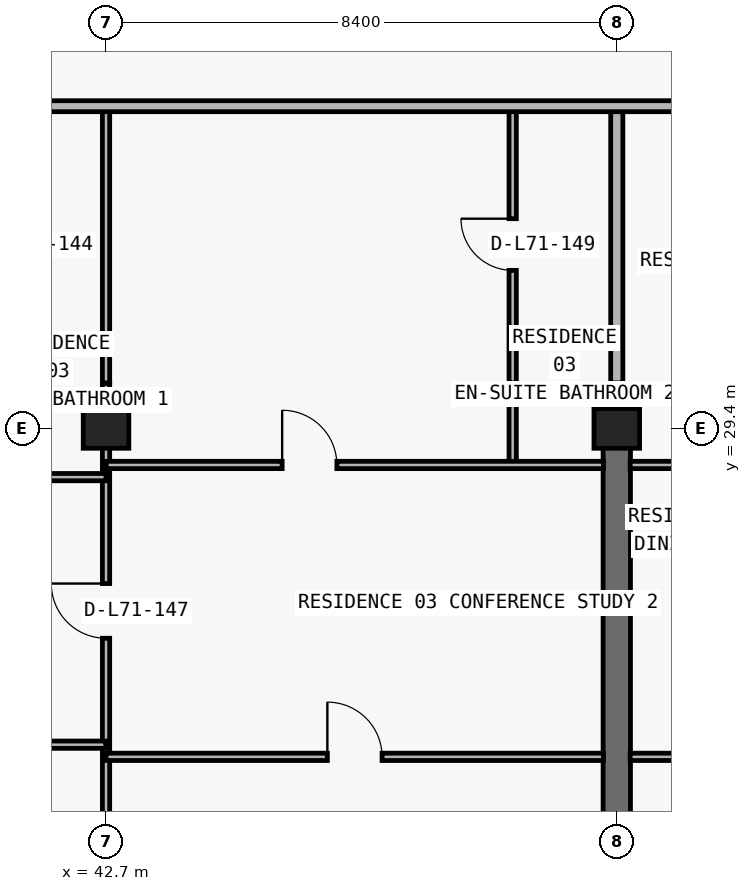
"""IFC4 building model, lengths in metres.
Left out: names, types, materials, properties, quantities, classifications, styles, units other than length and angle.
Written with IfcOpenShell. Run it as: python <this file> out.ifc"""

import sys

from ifc_helpers import new_model, si_unit, direction, frame, frame_2d, origin, origin_2d, place, context, subcontext, project, spatial, rectangle, extrude, element, fill, save


model = new_model("IFC4")
c1 = context("Model", 3, precision=1e-05, world=origin(), true_north=direction((0.0, 1.0)))
c2 = subcontext(c1, "Body", "Model", "MODEL_VIEW")
j1 = project(units=[si_unit("LENGTHUNIT", "METRE"), si_unit("PLANEANGLEUNIT", "RADIAN")], contexts=[c1])
p1 = place(None, origin())
s1 = spatial("IfcSite", under=j1, at=p1, CompositionType="ELEMENT")
p2 = place(p1, origin())
s2 = spatial("IfcBuilding", under=s1, at=p2, CompositionType="ELEMENT")
p3 = place(p2, frame((0.0, 0.0, 252.9)))
s3 = spatial("IfcBuildingStorey", under=s2, at=p3, CompositionType="ELEMENT", Elevation=252.9)
for number, where, z_axis, x_axis in (
    (1, (42.7, 29.4, 0.0), (0.0, 0.0, 1.0), (1.0, 0.0, 0.0)),
    (2, (51.1, 29.4, 0.0), (0.0, 0.0, 1.0), (1.0, 0.0, 0.0)),
):
    element("IfcColumn", number, at=place(p3, frame(where, z_axis=z_axis, x_axis=x_axis)), inside=s3, PredefinedType="COLUMN", context=c2, shape_type="SweptSolid", body=[
        extrude(rectangle(XDim=0.75, YDim=0.65, at=origin_2d()), origin(), (0.0, 0.0, 1.0), 3.05),
    ])
p4 = place(p3, frame((51.1, 20.8, 0.0), z_axis=(0.0, 0.0, 1.0), x_axis=(0.0, 1.0, 0.0)))
e3 = element("IfcWall", 3, at=p4, inside=s3, PredefinedType="SHEAR", context=c2, shape_type="SweptSolid", body=[
    extrude(rectangle(XDim=8.6, YDim=0.45, at=frame_2d((4.3, 0.0))), origin(), (0.0, 0.0, 1.0), 3.05),
])
p5 = place(p3, frame((42.7, 13.34, 0.0), z_axis=(0.0, 0.0, 1.0), x_axis=(0.0, 1.0, 0.0)))
e4 = element("IfcWall", 4, at=p5, inside=s3, PredefinedType="PARTITIONING", context=c2, shape_type="SweptSolid", body=[
    extrude(rectangle(XDim=16.8, YDim=0.12, at=frame_2d((8.4, 0.0))), origin(), (0.0, 0.0, 1.0), 2.263),
])
p6 = place(p5, frame((12.61, 0.0, 0.0)))
e5 = element("IfcOpeningElement", 5, at=p6, cuts=e4, PredefinedType="OPENING", context=c2, shape_type="SweptSolid", body=[
    extrude(rectangle(XDim=0.9, YDim=2.15, at=frame_2d((0.45, 1.075))), frame((0.0, 0.07, 0.0), z_axis=(0.0, -1.0, 0.0), x_axis=(1.0, 0.0, 0.0)), (0.0, 0.0, 1.0), 0.14),
])
p7 = place(p3, frame((42.7, 30.15, 0.0), z_axis=(0.0, 0.0, 1.0), x_axis=(0.0, 1.0, 0.0)))
e6 = element("IfcWall", 6, at=p7, inside=s3, PredefinedType="PARTITIONING", context=c2, shape_type="SweptSolid", body=[
    extrude(rectangle(XDim=4.55, YDim=0.12, at=frame_2d((2.275, 0.0))), origin(), (0.0, 0.0, 1.0), 2.263),
])
p8 = place(p3, frame((49.388, 28.8, 0.0), z_axis=(0.0, 0.0, 1.0), x_axis=(0.0, 1.0, 0.0)))
e7 = element("IfcWall", 7, at=p8, inside=s3, PredefinedType="PARTITIONING", context=c2, shape_type="SweptSolid", body=[
    extrude(rectangle(XDim=1.34, YDim=0.12, at=frame_2d((0.67, 0.0))), origin(), (0.0, 0.0, 1.0), 3.05),
])
p9 = place(p3, frame((49.388, 30.15, 0.0), z_axis=(0.0, 0.0, 1.0), x_axis=(0.0, 1.0, 0.0)))
e8 = element("IfcWall", 8, at=p9, inside=s3, PredefinedType="PARTITIONING", context=c2, shape_type="SweptSolid", body=[
    extrude(rectangle(XDim=4.55, YDim=0.12, at=frame_2d((2.275, 0.0))), origin(), (0.0, 0.0, 1.0), 3.05),
])
p10 = place(p9, frame((1.85, 0.0, 0.0)))
e9 = element("IfcOpeningElement", 9, at=p10, cuts=e8, PredefinedType="OPENING", context=c2, shape_type="SweptSolid", body=[
    extrude(rectangle(XDim=0.85, YDim=2.1, at=frame_2d((0.425, 1.05))), frame((0.0, 0.07, 0.0), z_axis=(0.0, -1.0, 0.0), x_axis=(1.0, 0.0, 0.0)), (0.0, 0.0, 1.0), 0.14),
])
p11 = place(p3, frame((51.1, 29.405, 0.0), z_axis=(0.0, 0.0, 1.0), x_axis=(0.0, 1.0, 0.0)))
e10 = element("IfcWall", 10, at=p11, inside=s3, PredefinedType="PARTITIONING", context=c2, shape_type="SweptSolid", body=[
    extrude(rectangle(XDim=0.735, YDim=0.2, at=frame_2d((0.367, 0.0))), origin(), (0.0, 0.0, 1.0), 2.335),
])
p12 = place(p3, frame((51.1, 30.15, 0.0), z_axis=(0.0, 0.0, 1.0), x_axis=(0.0, 1.0, 0.0)))
e11 = element("IfcWall", 11, at=p12, inside=s3, PredefinedType="PARTITIONING", context=c2, shape_type="SweptSolid", body=[
    extrude(rectangle(XDim=4.55, YDim=0.2, at=frame_2d((2.275, 0.0))), origin(), (0.0, 0.0, 1.0), 2.335),
])
p13 = place(p3, frame((42.7, 24.0, 0.0), z_axis=(0.0, 0.0, 1.0), x_axis=(1.0, 0.0, 0.0)))
e12 = element("IfcWall", 12, at=p13, inside=s3, PredefinedType="PARTITIONING", context=c2, shape_type="SweptSolid", body=[
    extrude(rectangle(XDim=8.18, YDim=0.12, at=frame_2d((4.09, 0.0))), origin(), (0.0, 0.0, 1.0), 3.05),
])
p14 = place(p13, frame((3.64, 0.0, 0.0)))
e13 = element("IfcOpeningElement", 13, at=p14, cuts=e12, PredefinedType="OPENING", context=c2, shape_type="SweptSolid", body=[
    extrude(rectangle(XDim=0.9, YDim=2.15, at=frame_2d((0.45, 1.075))), frame((0.0, 0.07, 0.0), z_axis=(0.0, -1.0, 0.0), x_axis=(1.0, 0.0, 0.0)), (0.0, 0.0, 1.0), 0.14),
])
p15 = place(p3, frame((51.32, 24.0, 0.0), z_axis=(0.0, 0.0, 1.0), x_axis=(1.0, 0.0, 0.0)))
e14 = element("IfcWall", 14, at=p15, inside=s3, PredefinedType="PARTITIONING", context=c2, shape_type="SweptSolid", body=[
    extrude(rectangle(XDim=8.18, YDim=0.12, at=frame_2d((4.09, 0.0))), origin(), (0.0, 0.0, 1.0), 3.05),
])
p16 = place(p15, frame((1.204, 0.0, 0.0)))
e15 = element("IfcOpeningElement", 15, at=p16, cuts=e14, PredefinedType="OPENING", context=c2, shape_type="SweptSolid", body=[
    extrude(rectangle(XDim=0.9, YDim=2.15, at=frame_2d((0.45, 1.075))), frame((0.0, 0.07, 0.0), z_axis=(0.0, -1.0, 0.0), x_axis=(1.0, 0.0, 0.0)), (0.0, 0.0, 1.0), 0.14),
])
p17 = place(p3, frame((35.105, 24.2, 0.0), z_axis=(0.0, 0.0, 1.0), x_axis=(1.0, 0.0, 0.0)))
e16 = element("IfcWall", 16, at=p17, inside=s3, PredefinedType="PARTITIONING", context=c2, shape_type="SweptSolid", body=[
    extrude(rectangle(XDim=7.59, YDim=0.12, at=frame_2d((3.795, 0.0))), origin(), (0.0, 0.0, 1.0), 3.05),
])
p18 = place(p17, frame((3.345, 0.0, 0.0)))
e17 = element("IfcOpeningElement", 17, at=p18, cuts=e16, PredefinedType="OPENING", context=c2, shape_type="SweptSolid", body=[
    extrude(rectangle(XDim=0.9, YDim=2.15, at=frame_2d((0.45, 1.075))), frame((0.0, 0.07, 0.0), z_axis=(0.0, -1.0, 0.0), x_axis=(1.0, 0.0, 0.0)), (0.0, 0.0, 1.0), 0.14),
])
p19 = place(p3, frame((35.1, 28.6, 0.0), z_axis=(0.0, 0.0, 1.0), x_axis=(1.0, 0.0, 0.0)))
e18 = element("IfcWall", 18, at=p19, inside=s3, PredefinedType="PARTITIONING", context=c2, shape_type="SweptSolid", body=[
    extrude(rectangle(XDim=7.6, YDim=0.12, at=frame_2d((3.8, 0.0))), origin(), (0.0, 0.0, 1.0), 3.05),
])
p20 = place(p19, frame((2.563, 0.0, 0.0)))
e19 = element("IfcOpeningElement", 19, at=p20, cuts=e18, PredefinedType="OPENING", context=c2, shape_type="SweptSolid", body=[
    extrude(rectangle(XDim=0.9, YDim=2.15, at=frame_2d((0.45, 1.075))), frame((0.0, 0.07, 0.0), z_axis=(0.0, -1.0, 0.0), x_axis=(1.0, 0.0, 0.0)), (0.0, 0.0, 1.0), 0.14),
])
p21 = place(p3, frame((42.705, 28.8, 0.0), z_axis=(0.0, 0.0, 1.0), x_axis=(1.0, 0.0, 0.0)))
e20 = element("IfcWall", 20, at=p21, inside=s3, PredefinedType="PARTITIONING", context=c2, shape_type="SweptSolid", body=[
    extrude(rectangle(XDim=8.175, YDim=0.12, at=frame_2d((4.087, 0.0))), origin(), (0.0, 0.0, 1.0), 3.05),
])
p22 = place(p21, frame((2.892, 0.0, 0.0)))
e21 = element("IfcOpeningElement", 21, at=p22, cuts=e20, PredefinedType="OPENING", context=c2, shape_type="SweptSolid", body=[
    extrude(rectangle(XDim=0.9, YDim=2.15, at=frame_2d((0.45, 1.075))), frame((0.0, 0.07, 0.0), z_axis=(0.0, -1.0, 0.0), x_axis=(1.0, 0.0, 0.0)), (0.0, 0.0, 1.0), 0.14),
])
p23 = place(p3, frame((51.32, 28.8, 0.0), z_axis=(0.0, 0.0, 1.0), x_axis=(1.0, 0.0, 0.0)))
e22 = element("IfcWall", 22, at=p23, inside=s3, PredefinedType="PARTITIONING", context=c2, shape_type="SweptSolid", body=[
    extrude(rectangle(XDim=8.175, YDim=0.12, at=frame_2d((4.087, 0.0))), origin(), (0.0, 0.0, 1.0), 3.05),
])
p24 = place(p23, frame((1.204, 0.0, 0.0)))
e23 = element("IfcOpeningElement", 23, at=p24, cuts=e22, PredefinedType="OPENING", context=c2, shape_type="SweptSolid", body=[
    extrude(rectangle(XDim=0.9, YDim=2.15, at=frame_2d((0.45, 1.075))), frame((0.0, 0.07, 0.0), z_axis=(0.0, -1.0, 0.0), x_axis=(1.0, 0.0, 0.0)), (0.0, 0.0, 1.0), 0.14),
])
p25 = place(p3, frame((26.7, 34.7, 0.0), z_axis=(0.0, 0.0, 1.0), x_axis=(1.0, 0.0, 0.0)))
e24 = element("IfcWall", 24, at=p25, inside=s3, PredefinedType="PARTITIONING", context=c2, shape_type="SweptSolid", body=[
    extrude(rectangle(XDim=39.0, YDim=0.18, at=frame_2d((19.5, 0.0))), origin(), (0.0, 0.0, 1.0), 3.05),
])
p26 = place(p25, frame((2.827, 0.0, 0.0)))
e25 = element("IfcOpeningElement", 25, at=p26, cuts=e24, PredefinedType="OPENING", context=c2, shape_type="SweptSolid", body=[
    extrude(rectangle(XDim=1.0, YDim=2.2, at=frame_2d((0.5, 1.1))), frame((0.0, 0.1, 0.0), z_axis=(0.0, -1.0, 0.0), x_axis=(1.0, 0.0, 0.0)), (0.0, 0.0, 1.0), 0.2),
])
p27 = place(p25, frame((27.27, 0.0, 0.0)))
e26 = element("IfcOpeningElement", 26, at=p27, cuts=e24, PredefinedType="OPENING", context=c2, shape_type="SweptSolid", body=[
    extrude(rectangle(XDim=1.0, YDim=2.2, at=frame_2d((0.5, 1.1))), frame((0.0, 0.1, 0.0), z_axis=(0.0, -1.0, 0.0), x_axis=(1.0, 0.0, 0.0)), (0.0, 0.0, 1.0), 0.2),
])
p28 = place(p6, origin())
e27 = element("IfcDoor", 27, at=p28, inside=s3, OperationType="SINGLE_SWING_RIGHT", PredefinedType="DOOR", context=c2, shape_type="SweptSolid", body=[
    extrude(rectangle(XDim=0.9, YDim=2.15, at=frame_2d((0.45, 1.075))), frame((0.0, 0.025, 0.0), z_axis=(0.0, -1.0, 0.0), x_axis=(1.0, 0.0, 0.0)), (0.0, 0.0, 1.0), 0.05),
])
fill(e5, e27)
p29 = place(p22, origin())
e28 = element("IfcDoor", 28, at=p29, inside=s3, OperationType="SINGLE_SWING_LEFT", PredefinedType="DOOR", context=c2, shape_type="SweptSolid", body=[
    extrude(rectangle(XDim=0.9, YDim=2.15, at=frame_2d((0.45, 1.075))), frame((0.0, 0.025, 0.0), z_axis=(0.0, -1.0, 0.0), x_axis=(1.0, 0.0, 0.0)), (0.0, 0.0, 1.0), 0.05),
])
fill(e21, e28)
p30 = place(p10, origin())
e29 = element("IfcDoor", 29, at=p30, inside=s3, OperationType="SINGLE_SWING_RIGHT", PredefinedType="DOOR", context=c2, shape_type="SweptSolid", body=[
    extrude(rectangle(XDim=0.85, YDim=2.1, at=frame_2d((0.425, 1.05))), frame((0.0, 0.025, 0.0), z_axis=(0.0, -1.0, 0.0), x_axis=(1.0, 0.0, 0.0)), (0.0, 0.0, 1.0), 0.05),
])
fill(e9, e29)
p31 = place(p14, origin())
e30 = element("IfcDoor", 30, at=p31, inside=s3, OperationType="SINGLE_SWING_LEFT", PredefinedType="DOOR", context=c2, shape_type="SweptSolid", body=[
    extrude(rectangle(XDim=0.9, YDim=2.15, at=frame_2d((0.45, 1.075))), frame((0.0, 0.025, 0.0), z_axis=(0.0, -1.0, 0.0), x_axis=(1.0, 0.0, 0.0)), (0.0, 0.0, 1.0), 0.05),
])
fill(e13, e30)
save(model, sys.argv[1])
